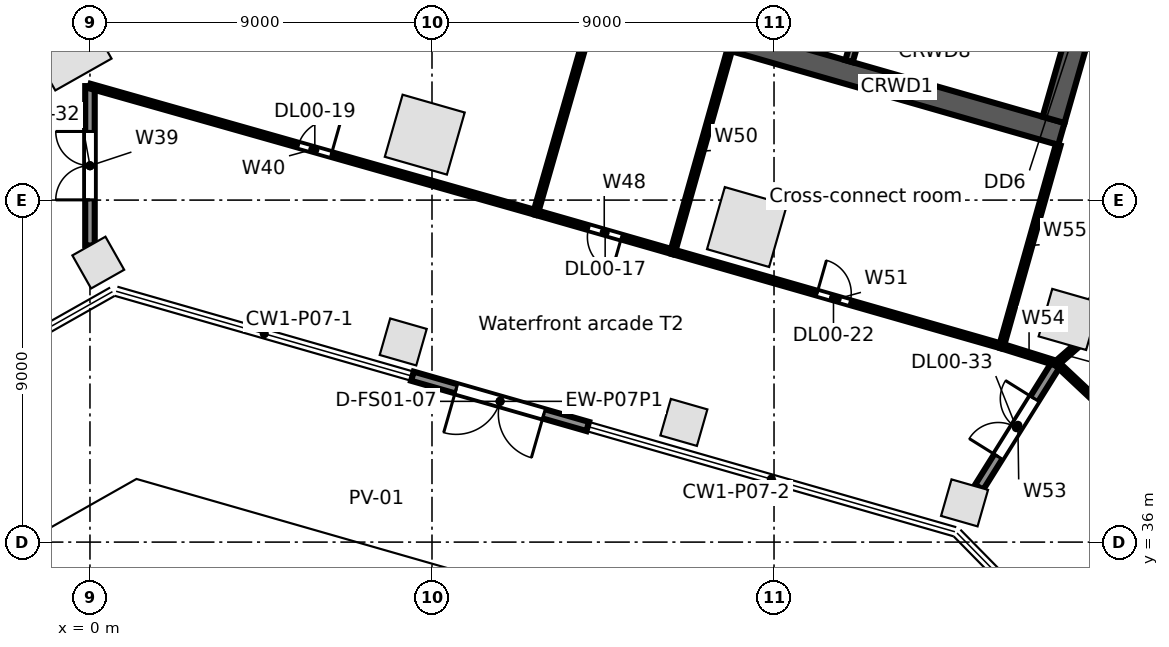
"""IFC4 building model, lengths in metres.
Left out: names, types, materials, properties, quantities, classifications, styles, units other than length and angle.
Written with IfcOpenShell. Run it as: python <this file> out.ifc"""

import sys

from ifc_helpers import new_model, si_unit, direction, frame, frame_2d, origin, origin_2d, place, context, subcontext, project, spatial, rectangle, extrude, element, fill, save


model = new_model("IFC4")
c1 = context("Model", 3, precision=1e-05, world=origin(), true_north=direction((0.0, 1.0)))
c2 = subcontext(c1, "Body", "Model", "MODEL_VIEW")
j1 = project(units=[si_unit("LENGTHUNIT", "METRE"), si_unit("PLANEANGLEUNIT", "RADIAN")], contexts=[c1])
p1 = place(None, origin())
s1 = spatial("IfcSite", under=j1, at=p1, CompositionType="ELEMENT")
p2 = place(p1, origin())
s2 = spatial("IfcBuilding", under=s1, at=p2, CompositionType="ELEMENT")
p3 = place(p2, origin())
s3 = spatial("IfcBuildingStorey", under=s2, at=p3, CompositionType="ELEMENT", Elevation=0.0)
for number, where, z_axis, x_axis in (
    (1, (-0.591, 49.044, 0.0), (0.0, 0.0, 1.0), (0.87, 0.492, 0.0)),
    (2, (8.81, 46.722, 0.0), (0.0, 0.0, 1.0), (0.961, -0.276, 0.0)),
    (3, (17.288, 44.291, 0.0), (0.0, 0.0, 1.0), (0.961, -0.276, 0.0)),
):
    element("IfcColumn", number, at=place(p3, frame(where, z_axis=z_axis, x_axis=x_axis)), inside=s3, PredefinedType="COLUMN", context=c2, shape_type="SweptSolid", body=[
        extrude(rectangle(XDim=1.7, YDim=1.7, at=origin_2d()), origin(), (0.0, 0.0, 1.0), 6.5),
    ])
p4 = place(p3, frame((25.767, 41.86, 0.0), z_axis=(0.0, 0.0, 1.0), x_axis=(0.961261695938, -0.275637355817, 0.0)))
e4 = element("IfcColumn", 4, at=p4, inside=s3, PredefinedType="COLUMN", context=c2, shape_type="SweptSolid", body=[
    extrude(rectangle(XDim=1.3, YDim=1.3, at=origin_2d()), origin(), (0.0, 0.0, 1.0), 6.5),
])
for number, where, z_axis, x_axis in (
    (5, (0.219, 43.355, 0.0), (0.0, 0.0, 1.0), (0.87, 0.492, 0.0)),
    (6, (8.243, 41.267, 0.0), (0.0, 0.0, 1.0), (0.961, -0.276, 0.0)),
    (7, (15.628, 39.149, 0.0), (0.0, 0.0, 1.0), (0.961, -0.276, 0.0)),
    (8, (23.013, 37.032, 0.0), (0.0, 0.0, 1.0), (0.961, -0.276, 0.0)),
):
    element("IfcColumn", number, at=place(p3, frame(where, z_axis=z_axis, x_axis=x_axis)), inside=s3, PredefinedType="COLUMN", context=c2, shape_type="SweptSolid", body=[
        extrude(rectangle(XDim=1.0, YDim=1.0, at=origin_2d()), origin(), (0.0, 0.0, 1.0), 6.5),
    ])
p5 = place(p3, frame((13.099, 39.042, 0.0), z_axis=(0.0, 0.0, 1.0), x_axis=(-0.961264405322, 0.275627906897, 0.0)))
e9 = element("IfcWall", 9, at=p5, inside=s3, PredefinedType="STANDARD", context=c2, shape_type="SweptSolid", body=[
    extrude(rectangle(XDim=4.8, YDim=0.25, at=frame_2d((2.4, 0.0))), origin(), (0.0, 0.0, 1.0), 6.15),
])
p6 = place(p5, frame((1.2, 0.0, 0.0)))
e10 = element("IfcOpeningElement", 10, at=p6, cuts=e9, PredefinedType="OPENING", context=c2, shape_type="SweptSolid", body=[
    extrude(rectangle(XDim=2.4, YDim=2.7, at=frame_2d((1.2, 1.35))), frame((0.0, 0.135, 0.0), z_axis=(0.0, -1.0, 0.0), x_axis=(1.0, 0.0, 0.0)), (0.0, 0.0, 1.0), 0.27),
])
p7 = place(p3, frame((16.911, 49.221, 0.0), z_axis=(0.0, 0.0, 1.0), x_axis=(0.96126248289, -0.275634611374, 0.0)))
e11 = element("IfcWall", 11, at=p7, inside=s3, PredefinedType="SOLIDWALL", context=c2, shape_type="SweptSolid", body=[
    extrude(rectangle(XDim=9.0, YDim=0.6, at=frame_2d((4.5, 0.0))), origin(), (0.0, 0.0, 1.0), 6.15),
])
p8 = place(p3, frame((19.973, 48.655, 0.0), z_axis=(0.0, 0.0, 1.0), x_axis=(0.275668441653, 0.961252781674, 0.0)))
e12 = element("IfcWall", 12, at=p8, inside=s3, PredefinedType="SOLIDWALL", context=c2, shape_type="SweptSolid", body=[
    extrude(rectangle(XDim=4.05, YDim=0.2, at=frame_2d((2.025, 0.0))), origin(), (0.0, 0.0, 1.0), 6.15),
])
p9 = place(p3, frame((25.356, 47.112, 0.0), z_axis=(0.0, 0.0, 1.0), x_axis=(0.275631631629, 0.961263337304, 0.0)))
e13 = element("IfcWall", 13, at=p9, inside=s3, PredefinedType="SOLIDWALL", context=c2, shape_type="SweptSolid", body=[
    extrude(rectangle(XDim=10.8, YDim=0.6, at=frame_2d((5.4, 0.0))), origin(), (0.0, 0.0, 1.0), 6.15),
])
p10 = place(p9, frame((4.8, 0.0, 0.0)))
e14 = element("IfcOpeningElement", 14, at=p10, cuts=e13, PredefinedType="OPENING", context=c2, shape_type="SweptSolid", body=[
    extrude(rectangle(XDim=1.2, YDim=2.1, at=frame_2d((0.6, 1.05))), frame((0.0, 0.31, 0.0), z_axis=(0.0, -1.0, 0.0), x_axis=(1.0, 0.0, 0.0)), (0.0, 0.0, 1.0), 0.62),
])
p11 = place(p3, frame((0.0, 43.806, 0.0), z_axis=(0.0, 0.0, 1.0), x_axis=(0.0, 1.0, 0.0)))
e15 = element("IfcWall", 15, at=p11, inside=s3, PredefinedType="PARTITIONING", context=c2, shape_type="SweptSolid", body=[
    extrude(rectangle(XDim=4.194, YDim=0.25, at=frame_2d((2.097, 0.0))), origin(), (0.0, 0.0, 1.0), 5.212),
])
p12 = place(p11, frame((1.2, 0.0, 0.0)))
e16 = element("IfcOpeningElement", 16, at=p12, cuts=e15, PredefinedType="OPENING", context=c2, shape_type="SweptSolid", body=[
    extrude(rectangle(XDim=1.8, YDim=2.1, at=frame_2d((0.9, 1.05))), frame((0.0, 0.135, 0.0), z_axis=(0.0, -1.0, 0.0), x_axis=(1.0, 0.0, 0.0)), (0.0, 0.0, 1.0), 0.27),
])
p13 = place(p3, frame((0.0, 48.0, 0.0), z_axis=(0.0, 0.0, 1.0), x_axis=(0.962053342028, -0.27286144303, 0.0)))
e17 = element("IfcWall", 17, at=p13, inside=s3, PredefinedType="PARTITIONING", context=c2, shape_type="SweptSolid", body=[
    extrude(rectangle(XDim=12.193, YDim=0.125, at=frame_2d((6.096, 0.0))), origin(), (0.0, 0.0, 1.0), 5.53),
])
p14 = place(p13, frame((5.7, 0.0, 0.0)))
e18 = element("IfcOpeningElement", 18, at=p14, cuts=e17, PredefinedType="OPENING", context=c2, shape_type="SweptSolid", body=[
    extrude(rectangle(XDim=0.9, YDim=2.1, at=frame_2d((0.45, 1.05))), frame((0.0, 0.073, 0.0), z_axis=(0.0, -1.0, 0.0), x_axis=(1.0, 0.0, 0.0)), (0.0, 0.0, 1.0), 0.145),
])
p15 = place(p3, frame((11.73, 44.673, 0.0), z_axis=(0.0, 0.0, 1.0), x_axis=(0.275635044812, 0.961262358605, 0.0)))
e19 = element("IfcWall", 19, at=p15, inside=s3, PredefinedType="PARTITIONING", context=c2, shape_type="SweptSolid", body=[
    extrude(rectangle(XDim=11.5, YDim=0.125, at=frame_2d((5.75, 0.0))), origin(), (0.0, 0.0, 1.0), 5.212),
])
p16 = place(p3, frame((11.73, 44.673, 0.0), z_axis=(0.0, 0.0, 1.0), x_axis=(0.961228613303, -0.275752702557, 0.0)))
e20 = element("IfcWall", 20, at=p16, inside=s3, PredefinedType="PARTITIONING", context=c2, shape_type="SweptSolid", body=[
    extrude(rectangle(XDim=3.75, YDim=0.125, at=frame_2d((1.875, 0.0))), origin(), (0.0, 0.0, 1.0), 6.15),
])
p17 = place(p16, frame((1.45, 0.0, 0.0)))
e21 = element("IfcOpeningElement", 21, at=p17, cuts=e20, PredefinedType="OPENING", context=c2, shape_type="SweptSolid", body=[
    extrude(rectangle(XDim=0.9, YDim=2.1, at=frame_2d((0.45, 1.05))), frame((0.0, 0.073, 0.0), z_axis=(0.0, -1.0, 0.0), x_axis=(1.0, 0.0, 0.0)), (0.0, 0.0, 1.0), 0.145),
])
p18 = place(p3, frame((15.335, 43.639, 0.0), z_axis=(0.0, 0.0, 1.0), x_axis=(0.271407455373, 0.962464541252, 0.0)))
e22 = element("IfcWall", 22, at=p18, inside=s3, PredefinedType="PARTITIONING", context=c2, shape_type="SweptSolid", body=[
    extrude(rectangle(XDim=5.501, YDim=0.125, at=frame_2d((2.75, 0.0))), origin(), (0.0, 0.0, 1.0), 5.43),
])
p19 = place(p3, frame((15.335, 43.639, 0.0), z_axis=(0.0, 0.0, 1.0), x_axis=(0.961281982754, -0.275566597455, 0.0)))
e23 = element("IfcWall", 23, at=p19, inside=s3, PredefinedType="PARTITIONING", context=c2, shape_type="SweptSolid", body=[
    extrude(rectangle(XDim=9.0, YDim=0.125, at=frame_2d((4.5, 0.0))), origin(), (0.0, 0.0, 1.0), 5.322),
])
p20 = place(p19, frame((3.95, 0.0, 0.0)))
e24 = element("IfcOpeningElement", 24, at=p20, cuts=e23, PredefinedType="OPENING", context=c2, shape_type="SweptSolid", body=[
    extrude(rectangle(XDim=0.9, YDim=2.1, at=frame_2d((0.45, 1.05))), frame((0.0, 0.073, 0.0), z_axis=(0.0, -1.0, 0.0), x_axis=(1.0, 0.0, 0.0)), (0.0, 0.0, 1.0), 0.145),
])
p21 = place(p3, frame((23.397, 37.442, 0.0), z_axis=(0.0, 0.0, 1.0), x_axis=(0.529805058875, 0.848119448893, 0.0)))
e25 = element("IfcWall", 25, at=p21, inside=s3, PredefinedType="PARTITIONING", context=c2, shape_type="SweptSolid", body=[
    extrude(rectangle(XDim=3.849, YDim=0.25, at=frame_2d((1.924, 0.0))), origin(), (0.0, 0.0, 1.0), 5.212),
])
p22 = place(p21, frame((0.95, 0.0, 0.0)))
e26 = element("IfcOpeningElement", 26, at=p22, cuts=e25, PredefinedType="OPENING", context=c2, shape_type="SweptSolid", body=[
    extrude(rectangle(XDim=1.8, YDim=2.1, at=frame_2d((0.9, 1.05))), frame((0.0, 0.135, 0.0), z_axis=(0.0, -1.0, 0.0), x_axis=(1.0, 0.0, 0.0)), (0.0, 0.0, 1.0), 0.27),
])
p23 = place(p3, frame((23.986, 41.159, 0.0), z_axis=(0.0, 0.0, 1.0), x_axis=(0.954522865266, -0.298137719325, 0.0)))
e27 = element("IfcWall", 27, at=p23, inside=s3, PredefinedType="PARTITIONING", context=c2, shape_type="SweptSolid", body=[
    extrude(rectangle(XDim=1.519, YDim=0.125, at=frame_2d((0.76, 0.0))), origin(), (0.0, 0.0, 1.0), 5.212),
])
p24 = place(p3, frame((23.986, 41.159, 0.0), z_axis=(0.0, 0.0, 1.0), x_axis=(0.271465437068, 0.962448188983, 0.0)))
e28 = element("IfcWall", 28, at=p24, inside=s3, PredefinedType="PARTITIONING", context=c2, shape_type="SweptSolid", body=[
    extrude(rectangle(XDim=5.5, YDim=0.125, at=frame_2d((2.75, 0.0))), origin(), (0.0, 0.0, 1.0), 5.43),
])
p25 = place(p3, frame((25.436, 40.706, 0.0), z_axis=(0.0, 0.0, 1.0), x_axis=(0.753521944961, 0.657422754749, 0.0)))
e29 = element("IfcWall", 29, at=p25, inside=s3, PredefinedType="PARTITIONING", context=c2, shape_type="SweptSolid", body=[
    extrude(rectangle(XDim=0.656, YDim=0.125, at=frame_2d((0.328, 0.0))), origin(), (0.0, 0.0, 1.0), 6.15),
])
p26 = place(p3, frame((25.436, 40.706, 0.0), z_axis=(0.0, 0.0, 1.0), x_axis=(0.729011488135, -0.684501461041, 0.0)))
e30 = element("IfcWall", 30, at=p26, inside=s3, PredefinedType="PARTITIONING", context=c2, shape_type="SweptSolid", body=[
    extrude(rectangle(XDim=4.202, YDim=0.125, at=frame_2d((2.101, 0.0))), origin(), (0.0, 0.0, 1.0), 6.15),
])
p27 = place(p26, frame((1.7, 0.0, 0.0)))
e31 = element("IfcOpeningElement", 31, at=p27, cuts=e30, PredefinedType="OPENING", context=c2, shape_type="SweptSolid", body=[
    extrude(rectangle(XDim=0.9, YDim=2.1, at=frame_2d((0.45, 1.05))), frame((0.0, 0.073, 0.0), z_axis=(0.0, -1.0, 0.0), x_axis=(1.0, 0.0, 0.0)), (0.0, 0.0, 1.0), 0.145),
])
p28 = place(p6, origin())
e32 = element("IfcDoor", 32, at=p28, inside=s3, OperationType="DOUBLE_DOOR_SINGLE_SWING", PredefinedType="DOOR", context=c2, shape_type="SweptSolid", body=[
    extrude(rectangle(XDim=2.4, YDim=2.7, at=frame_2d((1.2, 1.35))), frame((0.0, 0.025, 0.0), z_axis=(0.0, -1.0, 0.0), x_axis=(1.0, 0.0, 0.0)), (0.0, 0.0, 1.0), 0.05),
])
fill(e10, e32)
p29 = place(p17, frame((0.9, 0.0, 0.0), z_axis=(0.0, 0.0, 1.0), x_axis=(-1.0, 0.0, 0.0)))
e33 = element("IfcDoor", 33, at=p29, inside=s3, OperationType="SINGLE_SWING_LEFT", PredefinedType="DOOR", context=c2, shape_type="SweptSolid", body=[
    extrude(rectangle(XDim=0.9, YDim=2.1, at=frame_2d((0.45, 1.05))), frame((0.0, 0.025, 0.0), z_axis=(0.0, -1.0, 0.0), x_axis=(1.0, 0.0, 0.0)), (0.0, 0.0, 1.0), 0.05),
])
fill(e21, e33)
p30 = place(p14, origin())
e34 = element("IfcDoor", 34, at=p30, inside=s3, OperationType="SINGLE_SWING_RIGHT", PredefinedType="DOOR", context=c2, shape_type="SweptSolid", body=[
    extrude(rectangle(XDim=0.9, YDim=2.1, at=frame_2d((0.45, 1.05))), frame((0.0, 0.025, 0.0), z_axis=(0.0, -1.0, 0.0), x_axis=(1.0, 0.0, 0.0)), (0.0, 0.0, 1.0), 0.05),
])
fill(e18, e34)
p31 = place(p20, origin())
e35 = element("IfcDoor", 35, at=p31, inside=s3, OperationType="SINGLE_SWING_LEFT", PredefinedType="DOOR", context=c2, shape_type="SweptSolid", body=[
    extrude(rectangle(XDim=0.9, YDim=2.1, at=frame_2d((0.45, 1.05))), frame((0.0, 0.025, 0.0), z_axis=(0.0, -1.0, 0.0), x_axis=(1.0, 0.0, 0.0)), (0.0, 0.0, 1.0), 0.05),
])
fill(e24, e35)
p32 = place(p12, origin())
e36 = element("IfcDoor", 36, at=p32, inside=s3, OperationType="DOUBLE_DOOR_SINGLE_SWING", PredefinedType="DOOR", context=c2, shape_type="SweptSolid", body=[
    extrude(rectangle(XDim=1.8, YDim=2.1, at=frame_2d((0.9, 1.05))), frame((0.0, 0.025, 0.0), z_axis=(0.0, -1.0, 0.0), x_axis=(1.0, 0.0, 0.0)), (0.0, 0.0, 1.0), 0.05),
])
fill(e16, e36)
p33 = place(p22, origin())
e37 = element("IfcDoor", 37, at=p33, inside=s3, OperationType="DOUBLE_DOOR_SINGLE_SWING", PredefinedType="DOOR", context=c2, shape_type="SweptSolid", body=[
    extrude(rectangle(XDim=1.8, YDim=2.1, at=frame_2d((0.9, 1.05))), frame((0.0, 0.025, 0.0), z_axis=(0.0, -1.0, 0.0), x_axis=(1.0, 0.0, 0.0)), (0.0, 0.0, 1.0), 0.05),
])
fill(e26, e37)
save(model, sys.argv[1])
